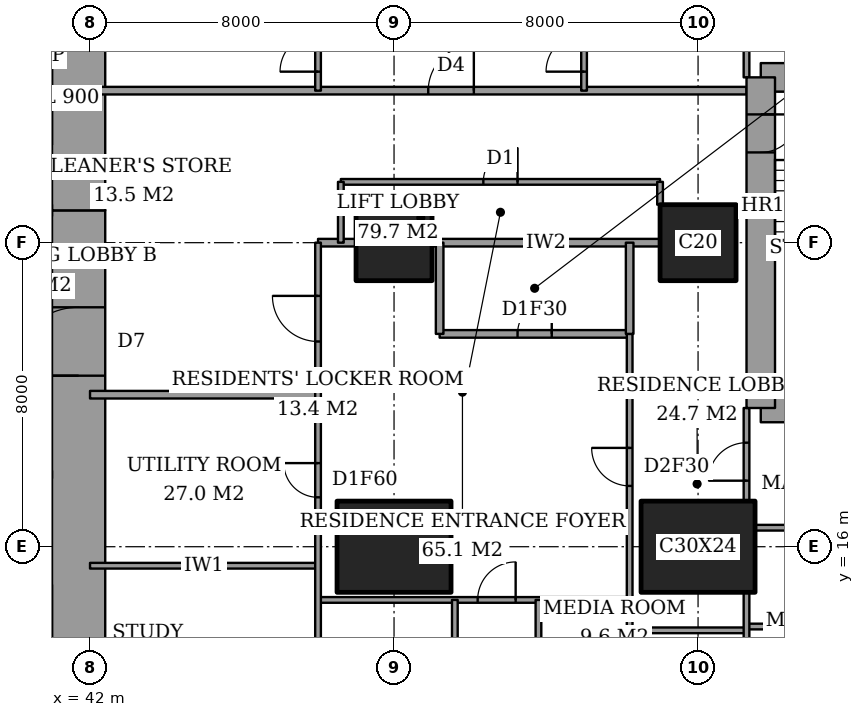
"""IFC4 building model, lengths in metres.
Left out: names, types, materials, properties, quantities, classifications, styles, units other than length and angle.
Written with IfcOpenShell. Run it as: python <this file> out.ifc"""

import sys

from ifc_helpers import new_model, si_unit, direction, frame, frame_2d, origin, origin_2d, place, context, subcontext, project, spatial, rectangle, extrude, element, fill, save


model = new_model("IFC4")
c1 = context("Model", 3, precision=1e-05, world=origin(), true_north=direction((0.0, 1.0)))
c2 = subcontext(c1, "Body", "Model", "MODEL_VIEW")
j1 = project(units=[si_unit("LENGTHUNIT", "METRE"), si_unit("PLANEANGLEUNIT", "RADIAN")], contexts=[c1])
p1 = place(None, origin())
s1 = spatial("IfcSite", under=j1, at=p1, CompositionType="ELEMENT")
p2 = place(p1, origin())
s2 = spatial("IfcBuilding", under=s1, at=p2, CompositionType="ELEMENT")
p3 = place(p2, frame((0.0, 0.0, 96.2)))
s3 = spatial("IfcBuildingStorey", under=s2, at=p3, CompositionType="ELEMENT", Elevation=96.2)
p4 = place(p3, frame((50.0, 16.0, 0.0), z_axis=(0.0, 0.0, 1.0), x_axis=(1.0, 0.0, 0.0)))
e1 = element("IfcColumn", 1, at=p4, inside=s3, PredefinedType="COLUMN", context=c2, shape_type="SweptSolid", body=[
    extrude(rectangle(XDim=3.0, YDim=2.4, at=origin_2d()), origin(), (0.0, 0.0, 1.0), 3.6),
])
p5 = place(p3, frame((50.0, 24.0, 0.0), z_axis=(0.0, 0.0, 1.0), x_axis=(1.0, 0.0, 0.0)))
e2 = element("IfcColumn", 2, at=p5, inside=s3, PredefinedType="COLUMN", context=c2, shape_type="SweptSolid", body=[
    extrude(rectangle(XDim=2.0, YDim=2.0, at=origin_2d()), origin(), (0.0, 0.0, 1.0), 3.6),
])
p6 = place(p3, frame((58.0, 16.0, 0.0), z_axis=(0.0, 0.0, 1.0), x_axis=(1.0, 0.0, 0.0)))
e3 = element("IfcColumn", 3, at=p6, inside=s3, PredefinedType="COLUMN", context=c2, shape_type="SweptSolid", body=[
    extrude(rectangle(XDim=3.0, YDim=2.4, at=origin_2d()), origin(), (0.0, 0.0, 1.0), 3.6),
])
p7 = place(p3, frame((58.0, 24.0, 0.0), z_axis=(0.0, 0.0, 1.0), x_axis=(1.0, 0.0, 0.0)))
e4 = element("IfcColumn", 4, at=p7, inside=s3, PredefinedType="COLUMN", context=c2, shape_type="SweptSolid", body=[
    extrude(rectangle(XDim=2.0, YDim=2.0, at=origin_2d()), origin(), (0.0, 0.0, 1.0), 3.6),
])
p8 = place(p3, frame((41.7, 13.0, 0.0), z_axis=(0.0, 0.0, 1.0), x_axis=(0.0, 1.0, 0.0)))
e5 = element("IfcWall", 5, at=p8, inside=s3, PredefinedType="SHEAR", context=c2, shape_type="SweptSolid", body=[
    extrude(rectangle(XDim=11.85, YDim=1.4, at=frame_2d((5.925, 0.0))), origin(), (0.0, 0.0, 1.0), 3.6),
])
p9 = place(p8, frame((7.5, 0.0, 0.0)))
e6 = element("IfcOpeningElement", 6, at=p9, cuts=e5, PredefinedType="OPENING", context=c2, shape_type="SweptSolid", body=[
    extrude(rectangle(XDim=1.8, YDim=2.4, at=frame_2d((0.9, 1.2))), frame((0.0, 0.71, 0.0), z_axis=(0.0, -1.0, 0.0), x_axis=(1.0, 0.0, 0.0)), (0.0, 0.0, 1.0), 1.42),
])
p10 = place(p3, frame((41.7, 24.85, 0.0), z_axis=(0.0, 0.0, 1.0), x_axis=(0.0, 1.0, 0.0)))
e7 = element("IfcWall", 7, at=p10, inside=s3, PredefinedType="SHEAR", context=c2, shape_type="SweptSolid", body=[
    extrude(rectangle(XDim=10.15, YDim=1.4, at=frame_2d((5.075, 0.0))), origin(), (0.0, 0.0, 1.0), 3.6),
])
for number, where, z_axis, x_axis in (
    (8, (59.65, 19.65, 0.0), (0.0, 0.0, 1.0), (1.0, 0.0, 0.0)),
    (9, (64.1, 28.35, 0.0), (0.0, 0.0, 1.0), (-1.0, 0.0, 0.0)),
):
    element("IfcWall", number, at=place(p3, frame(where, z_axis=z_axis, x_axis=x_axis)), inside=s3, PredefinedType="SHEAR", context=c2, shape_type="SweptSolid", body=[
        extrude(rectangle(XDim=4.45, YDim=0.75, at=frame_2d((2.225, 0.0))), origin(), (0.0, 0.0, 1.0), 3.6),
    ])
p11 = place(p3, frame((59.65, 28.35, 0.0), z_axis=(0.0, 0.0, 1.0), x_axis=(0.0, -1.0, 0.0)))
e10 = element("IfcWall", 10, at=p11, inside=s3, PredefinedType="SHEAR", context=c2, shape_type="SweptSolid", body=[
    extrude(rectangle(XDim=8.7, YDim=0.75, at=frame_2d((4.35, 0.0))), origin(), (0.0, 0.0, 1.0), 3.6),
])
p12 = place(p11, frame((0.975, 0.0, 0.0)))
e11 = element("IfcOpeningElement", 11, at=p12, cuts=e10, PredefinedType="OPENING", context=c2, shape_type="SweptSolid", body=[
    extrude(rectangle(XDim=1.0, YDim=2.1, at=frame_2d((0.5, 1.05))), frame((0.0, 0.385, 0.0), z_axis=(0.0, -1.0, 0.0), x_axis=(1.0, 0.0, 0.0)), (0.0, 0.0, 1.0), 0.77),
])
p13 = place(p3, frame((56.2, 13.8, 0.0), z_axis=(0.0, 0.0, 1.0), x_axis=(1.0, 0.0, 0.0)))
e12 = element("IfcWall", 12, at=p13, inside=s3, PredefinedType="PARTITIONING", context=c2, shape_type="SweptSolid", body=[
    extrude(rectangle(XDim=3.075, YDim=0.15, at=frame_2d((1.538, 0.0))), origin(), (0.0, 0.0, 1.0), 3.35),
])
p14 = place(p3, frame((59.275, 13.9, 0.0), z_axis=(0.0, 0.0, 1.0), x_axis=(1.0, 0.0, 0.0)))
e13 = element("IfcWall", 13, at=p14, inside=s3, PredefinedType="PARTITIONING", context=c2, shape_type="SweptSolid", body=[
    extrude(rectangle(XDim=2.4, YDim=0.15, at=frame_2d((1.2, 0.0))), origin(), (0.0, 0.0, 1.0), 3.35),
])
p15 = place(p3, frame((48.0, 14.6, 0.0), z_axis=(0.0, 0.0, 1.0), x_axis=(1.0, 0.0, 0.0)))
e14 = element("IfcWall", 14, at=p15, inside=s3, PredefinedType="PARTITIONING", context=c2, shape_type="SweptSolid", body=[
    extrude(rectangle(XDim=8.2, YDim=0.15, at=frame_2d((4.1, 0.0))), origin(), (0.0, 0.0, 1.0), 3.35),
])
p16 = place(p15, frame((4.2, 0.0, 0.0)))
e15 = element("IfcOpeningElement", 15, at=p16, cuts=e14, PredefinedType="OPENING", context=c2, shape_type="SweptSolid", body=[
    extrude(rectangle(XDim=1.0, YDim=2.1, at=frame_2d((0.5, 1.05))), frame((0.0, 0.085, 0.0), z_axis=(0.0, -1.0, 0.0), x_axis=(1.0, 0.0, 0.0)), (0.0, 0.0, 1.0), 0.17),
])
p17 = place(p3, frame((42.0, 15.5, 0.0), z_axis=(0.0, 0.0, 1.0), x_axis=(1.0, 0.0, 0.0)))
e16 = element("IfcWall", 16, at=p17, inside=s3, PredefinedType="PARTITIONING", context=c2, shape_type="SweptSolid", body=[
    extrude(rectangle(XDim=6.0, YDim=0.15, at=frame_2d((3.0, 0.0))), origin(), (0.0, 0.0, 1.0), 3.35),
])
p18 = place(p3, frame((59.5, 16.5, 0.0), z_axis=(0.0, 0.0, 1.0), x_axis=(1.0, 0.0, 0.0)))
e17 = element("IfcWall", 17, at=p18, inside=s3, PredefinedType="PARTITIONING", context=c2, shape_type="SweptSolid", body=[
    extrude(rectangle(XDim=5.15, YDim=0.15, at=frame_2d((2.575, 0.0))), origin(), (0.0, 0.0, 1.0), 3.35),
])
p19 = place(p3, frame((42.0, 20.0, 0.0), z_axis=(0.0, 0.0, 1.0), x_axis=(1.0, 0.0, 0.0)))
e18 = element("IfcWall", 18, at=p19, inside=s3, PredefinedType="PARTITIONING", context=c2, shape_type="SweptSolid", body=[
    extrude(rectangle(XDim=6.0, YDim=0.2, at=frame_2d((3.0, 0.0))), origin(), (0.0, 0.0, 1.0), 3.35),
])
p20 = place(p3, frame((51.2, 21.6, 0.0), z_axis=(0.0, 0.0, 1.0), x_axis=(1.0, 0.0, 0.0)))
e19 = element("IfcWall", 19, at=p20, inside=s3, PredefinedType="PARTITIONING", context=c2, shape_type="SweptSolid", body=[
    extrude(rectangle(XDim=5.0, YDim=0.2, at=frame_2d((2.5, 0.0))), origin(), (0.0, 0.0, 1.0), 3.35),
])
p21 = place(p20, frame((2.05, 0.0, 0.0)))
e20 = element("IfcOpeningElement", 20, at=p21, cuts=e19, PredefinedType="OPENING", context=c2, shape_type="SweptSolid", body=[
    extrude(rectangle(XDim=0.9, YDim=2.1, at=frame_2d((0.45, 1.05))), frame((0.0, 0.11, 0.0), z_axis=(0.0, -1.0, 0.0), x_axis=(1.0, 0.0, 0.0)), (0.0, 0.0, 1.0), 0.22),
])
p22 = place(p3, frame((48.0, 24.0, 0.0), z_axis=(0.0, 0.0, 1.0), x_axis=(1.0, 0.0, 0.0)))
e21 = element("IfcWall", 21, at=p22, inside=s3, PredefinedType="PARTITIONING", context=c2, shape_type="SweptSolid", body=[
    extrude(rectangle(XDim=1.0, YDim=0.2, at=frame_2d((0.5, 0.0))), origin(), (0.0, 0.0, 1.0), 3.35),
])
p23 = place(p3, frame((51.0, 24.0, 0.0), z_axis=(0.0, 0.0, 1.0), x_axis=(1.0, 0.0, 0.0)))
e22 = element("IfcWall", 22, at=p23, inside=s3, PredefinedType="PARTITIONING", context=c2, shape_type="SweptSolid", body=[
    extrude(rectangle(XDim=6.0, YDim=0.2, at=frame_2d((3.0, 0.0))), origin(), (0.0, 0.0, 1.0), 3.35),
])
p24 = place(p3, frame((48.6, 25.6, 0.0), z_axis=(0.0, 0.0, 1.0), x_axis=(1.0, 0.0, 0.0)))
e23 = element("IfcWall", 23, at=p24, inside=s3, PredefinedType="PARTITIONING", context=c2, shape_type="SweptSolid", body=[
    extrude(rectangle(XDim=8.4, YDim=0.15, at=frame_2d((4.2, 0.0))), origin(), (0.0, 0.0, 1.0), 3.35),
])
p25 = place(p24, frame((3.75, 0.0, 0.0)))
e24 = element("IfcOpeningElement", 24, at=p25, cuts=e23, PredefinedType="OPENING", context=c2, shape_type="SweptSolid", body=[
    extrude(rectangle(XDim=0.9, YDim=2.1, at=frame_2d((0.45, 1.05))), frame((0.0, 0.085, 0.0), z_axis=(0.0, -1.0, 0.0), x_axis=(1.0, 0.0, 0.0)), (0.0, 0.0, 1.0), 0.17),
])
p26 = place(p3, frame((42.0, 28.0, 0.0), z_axis=(0.0, 0.0, 1.0), x_axis=(1.0, 0.0, 0.0)))
e25 = element("IfcWall", 25, at=p26, inside=s3, PredefinedType="PARTITIONING", context=c2, shape_type="SweptSolid", body=[
    extrude(rectangle(XDim=17.275, YDim=0.2, at=frame_2d((8.637, 0.0))), origin(), (0.0, 0.0, 1.0), 3.35),
])
p27 = place(p26, frame((8.9, 0.0, 0.0)))
e26 = element("IfcOpeningElement", 26, at=p27, cuts=e25, PredefinedType="OPENING", context=c2, shape_type="SweptSolid", body=[
    extrude(rectangle(XDim=1.2, YDim=2.4, at=frame_2d((0.6, 1.2))), frame((0.0, 0.11, 0.0), z_axis=(0.0, -1.0, 0.0), x_axis=(1.0, 0.0, 0.0)), (0.0, 0.0, 1.0), 0.22),
])
p28 = place(p3, frame((48.0, 10.6, 0.0), z_axis=(0.0, 0.0, 1.0), x_axis=(0.0, 1.0, 0.0)))
e27 = element("IfcWall", 27, at=p28, inside=s3, PredefinedType="PARTITIONING", context=c2, shape_type="SweptSolid", body=[
    extrude(rectangle(XDim=13.4, YDim=0.15, at=frame_2d((6.7, 0.0))), origin(), (0.0, 0.0, 1.0), 3.35),
])
p29 = place(p28, frame((10.8, 0.0, 0.0)))
e28 = element("IfcOpeningElement", 28, at=p29, cuts=e27, PredefinedType="OPENING", context=c2, shape_type="SweptSolid", body=[
    extrude(rectangle(XDim=1.2, YDim=2.4, at=frame_2d((0.6, 1.2))), frame((0.0, 0.085, 0.0), z_axis=(0.0, -1.0, 0.0), x_axis=(1.0, 0.0, 0.0)), (0.0, 0.0, 1.0), 0.17),
])
p30 = place(p28, frame((6.7, 0.0, 0.0)))
e29 = element("IfcOpeningElement", 29, at=p30, cuts=e27, PredefinedType="OPENING", context=c2, shape_type="SweptSolid", body=[
    extrude(rectangle(XDim=0.9, YDim=2.1, at=frame_2d((0.45, 1.05))), frame((0.0, 0.085, 0.0), z_axis=(0.0, -1.0, 0.0), x_axis=(1.0, 0.0, 0.0)), (0.0, 0.0, 1.0), 0.17),
])
p31 = place(p3, frame((48.0, 28.0, 0.0), z_axis=(0.0, 0.0, 1.0), x_axis=(0.0, 1.0, 0.0)))
e30 = element("IfcWall", 30, at=p31, inside=s3, PredefinedType="PARTITIONING", context=c2, shape_type="SweptSolid", body=[
    extrude(rectangle(XDim=9.4, YDim=0.15, at=frame_2d((4.7, 0.0))), origin(), (0.0, 0.0, 1.0), 3.35),
])
p32 = place(p31, frame((0.5, 0.0, 0.0)))
e31 = element("IfcOpeningElement", 31, at=p32, cuts=e30, PredefinedType="OPENING", context=c2, shape_type="SweptSolid", body=[
    extrude(rectangle(XDim=1.0, YDim=2.1, at=frame_2d((0.5, 1.05))), frame((0.0, 0.085, 0.0), z_axis=(0.0, -1.0, 0.0), x_axis=(1.0, 0.0, 0.0)), (0.0, 0.0, 1.0), 0.17),
])
p33 = place(p3, frame((48.6, 24.0, 0.0), z_axis=(0.0, 0.0, 1.0), x_axis=(0.0, 1.0, 0.0)))
e32 = element("IfcWall", 32, at=p33, inside=s3, PredefinedType="PARTITIONING", context=c2, shape_type="SweptSolid", body=[
    extrude(rectangle(XDim=1.6, YDim=0.15, at=frame_2d((0.8, 0.0))), origin(), (0.0, 0.0, 1.0), 3.35),
])
p34 = place(p3, frame((51.2, 21.6, 0.0), z_axis=(0.0, 0.0, 1.0), x_axis=(0.0, 1.0, 0.0)))
e33 = element("IfcWall", 33, at=p34, inside=s3, PredefinedType="PARTITIONING", context=c2, shape_type="SweptSolid", body=[
    extrude(rectangle(XDim=2.4, YDim=0.2, at=frame_2d((1.2, 0.0))), origin(), (0.0, 0.0, 1.0), 3.35),
])
for number, where, z_axis, x_axis in (
    (34, (51.6, 10.6, 0.0), (0.0, 0.0, 1.0), (0.0, 1.0, 0.0)),
    (35, (53.8, 10.6, 0.0), (0.0, 0.0, 1.0), (0.0, 1.0, 0.0)),
):
    element("IfcWall", number, at=place(p3, frame(where, z_axis=z_axis, x_axis=x_axis)), inside=s3, PredefinedType="PARTITIONING", context=c2, shape_type="SweptSolid", body=[
        extrude(rectangle(XDim=4.0, YDim=0.15, at=frame_2d((2.0, 0.0))), origin(), (0.0, 0.0, 1.0), 3.35),
    ])
p35 = place(p3, frame((55.0, 28.0, 0.0), z_axis=(0.0, 0.0, 1.0), x_axis=(0.0, 1.0, 0.0)))
e36 = element("IfcWall", 36, at=p35, inside=s3, PredefinedType="PARTITIONING", context=c2, shape_type="SweptSolid", body=[
    extrude(rectangle(XDim=9.4, YDim=0.15, at=frame_2d((4.7, 0.0))), origin(), (0.0, 0.0, 1.0), 3.35),
])
p36 = place(p35, frame((0.5, 0.0, 0.0)))
e37 = element("IfcOpeningElement", 37, at=p36, cuts=e36, PredefinedType="OPENING", context=c2, shape_type="SweptSolid", body=[
    extrude(rectangle(XDim=1.0, YDim=2.1, at=frame_2d((0.5, 1.05))), frame((0.0, 0.085, 0.0), z_axis=(0.0, -1.0, 0.0), x_axis=(1.0, 0.0, 0.0)), (0.0, 0.0, 1.0), 0.17),
])
p37 = place(p3, frame((56.2, 21.6, 0.0), z_axis=(0.0, 0.0, 1.0), x_axis=(0.0, 1.0, 0.0)))
e38 = element("IfcWall", 38, at=p37, inside=s3, PredefinedType="PARTITIONING", context=c2, shape_type="SweptSolid", body=[
    extrude(rectangle(XDim=2.4, YDim=0.2, at=frame_2d((1.2, 0.0))), origin(), (0.0, 0.0, 1.0), 3.35),
])
p38 = place(p3, frame((56.2, 10.6, 0.0), z_axis=(0.0, 0.0, 1.0), x_axis=(0.0, 1.0, 0.0)))
e39 = element("IfcWall", 39, at=p38, inside=s3, PredefinedType="PARTITIONING", context=c2, shape_type="SweptSolid", body=[
    extrude(rectangle(XDim=11.0, YDim=0.15, at=frame_2d((5.5, 0.0))), origin(), (0.0, 0.0, 1.0), 3.35),
])
p39 = place(p38, frame((7.0, 0.0, 0.0)))
e40 = element("IfcOpeningElement", 40, at=p39, cuts=e39, PredefinedType="OPENING", context=c2, shape_type="SweptSolid", body=[
    extrude(rectangle(XDim=1.0, YDim=2.1, at=frame_2d((0.5, 1.05))), frame((0.0, 0.085, 0.0), z_axis=(0.0, -1.0, 0.0), x_axis=(1.0, 0.0, 0.0)), (0.0, 0.0, 1.0), 0.17),
])
p40 = place(p3, frame((57.0, 25.0, 0.0), z_axis=(0.0, 0.0, 1.0), x_axis=(0.0, 1.0, 0.0)))
e41 = element("IfcWall", 41, at=p40, inside=s3, PredefinedType="PARTITIONING", context=c2, shape_type="SweptSolid", body=[
    extrude(rectangle(XDim=0.6, YDim=0.15, at=frame_2d((0.3, 0.0))), origin(), (0.0, 0.0, 1.0), 3.35),
])
p41 = place(p3, frame((59.275, 10.6, 0.0), z_axis=(0.0, 0.0, 1.0), x_axis=(0.0, 1.0, 0.0)))
e42 = element("IfcWall", 42, at=p41, inside=s3, PredefinedType="PARTITIONING", context=c2, shape_type="SweptSolid", body=[
    extrude(rectangle(XDim=4.2, YDim=0.15, at=frame_2d((2.1, 0.0))), origin(), (0.0, 0.0, 1.0), 3.35),
])
p42 = place(p3, frame((59.275, 17.2, 0.0), z_axis=(0.0, 0.0, 1.0), x_axis=(0.0, 1.0, 0.0)))
e43 = element("IfcWall", 43, at=p42, inside=s3, PredefinedType="PARTITIONING", context=c2, shape_type="SweptSolid", body=[
    extrude(rectangle(XDim=2.45, YDim=0.15, at=frame_2d((1.225, 0.0))), origin(), (0.0, 0.0, 1.0), 3.35),
])
p43 = place(p42, frame((0.538, 0.0, 0.0)))
e44 = element("IfcOpeningElement", 44, at=p43, cuts=e43, PredefinedType="OPENING", context=c2, shape_type="SweptSolid", body=[
    extrude(rectangle(XDim=1.0, YDim=2.1, at=frame_2d((0.5, 1.05))), frame((0.0, 0.085, 0.0), z_axis=(0.0, -1.0, 0.0), x_axis=(1.0, 0.0, 0.0)), (0.0, 0.0, 1.0), 0.17),
])
p44 = place(p3, frame((59.275, 28.35, 0.0), z_axis=(0.0, 0.0, 1.0), x_axis=(0.0, 1.0, 0.0)))
e45 = element("IfcWall", 45, at=p44, inside=s3, PredefinedType="PARTITIONING", context=c2, shape_type="SweptSolid", body=[
    extrude(rectangle(XDim=2.45, YDim=0.15, at=frame_2d((1.225, 0.0))), origin(), (0.0, 0.0, 1.0), 3.35),
])
p45 = place(p44, frame((0.913, 0.0, 0.0)))
e46 = element("IfcOpeningElement", 46, at=p45, cuts=e45, PredefinedType="OPENING", context=c2, shape_type="SweptSolid", body=[
    extrude(rectangle(XDim=1.0, YDim=2.1, at=frame_2d((0.5, 1.05))), frame((0.0, 0.085, 0.0), z_axis=(0.0, -1.0, 0.0), x_axis=(1.0, 0.0, 0.0)), (0.0, 0.0, 1.0), 0.17),
])
p46 = place(p3, frame((28.3, 17.9, 0.0), z_axis=(0.0, 0.0, 1.0), x_axis=(1.0, 0.0, 0.0)))
e47 = element("IfcWall", 47, at=p46, inside=s3, PredefinedType="PARTITIONING", context=c2, shape_type="SweptSolid", body=[
    extrude(rectangle(XDim=12.7, YDim=0.2, at=frame_2d((6.35, 0.0))), origin(), (0.0, 0.0, 1.0), 3.6),
])
p47 = place(p46, frame((0.95, 0.0, 0.0)))
e48 = element("IfcOpeningElement", 48, at=p47, cuts=e47, PredefinedType="OPENING", context=c2, shape_type="SweptSolid", body=[
    extrude(rectangle(XDim=1.1, YDim=2.1, at=frame_2d((0.55, 1.05))), frame((0.0, 0.11, 0.0), z_axis=(0.0, -1.0, 0.0), x_axis=(1.0, 0.0, 0.0)), (0.0, 0.0, 1.0), 0.22),
])
p48 = place(p46, frame((4.15, 0.0, 0.0)))
e49 = element("IfcOpeningElement", 49, at=p48, cuts=e47, PredefinedType="OPENING", context=c2, shape_type="SweptSolid", body=[
    extrude(rectangle(XDim=1.1, YDim=2.1, at=frame_2d((0.55, 1.05))), frame((0.0, 0.11, 0.0), z_axis=(0.0, -1.0, 0.0), x_axis=(1.0, 0.0, 0.0)), (0.0, 0.0, 1.0), 0.22),
])
p49 = place(p46, frame((7.35, 0.0, 0.0)))
e50 = element("IfcOpeningElement", 50, at=p49, cuts=e47, PredefinedType="OPENING", context=c2, shape_type="SweptSolid", body=[
    extrude(rectangle(XDim=1.1, YDim=2.1, at=frame_2d((0.55, 1.05))), frame((0.0, 0.11, 0.0), z_axis=(0.0, -1.0, 0.0), x_axis=(1.0, 0.0, 0.0)), (0.0, 0.0, 1.0), 0.22),
])
p50 = place(p46, frame((10.6, 0.0, 0.0)))
e51 = element("IfcOpeningElement", 51, at=p50, cuts=e47, PredefinedType="OPENING", context=c2, shape_type="SweptSolid", body=[
    extrude(rectangle(XDim=1.2, YDim=2.1, at=frame_2d((0.6, 1.05))), frame((0.0, 0.11, 0.0), z_axis=(0.0, -1.0, 0.0), x_axis=(1.0, 0.0, 0.0)), (0.0, 0.0, 1.0), 0.22),
])
p51 = place(p43, origin())
e52 = element("IfcDoor", 52, at=p51, inside=s3, OperationType="SINGLE_SWING_RIGHT", PredefinedType="DOOR", context=c2, shape_type="SweptSolid", body=[
    extrude(rectangle(XDim=1.0, YDim=2.1, at=frame_2d((0.5, 1.05))), frame((0.0, 0.025, 0.0), z_axis=(0.0, -1.0, 0.0), x_axis=(1.0, 0.0, 0.0)), (0.0, 0.0, 1.0), 0.05),
])
fill(e44, e52)
p52 = place(p39, origin())
e53 = element("IfcDoor", 53, at=p52, inside=s3, OperationType="SINGLE_SWING_LEFT", PredefinedType="DOOR", context=c2, shape_type="SweptSolid", body=[
    extrude(rectangle(XDim=1.0, YDim=2.1, at=frame_2d((0.5, 1.05))), frame((0.0, 0.025, 0.0), z_axis=(0.0, -1.0, 0.0), x_axis=(1.0, 0.0, 0.0)), (0.0, 0.0, 1.0), 0.05),
])
fill(e40, e53)
p53 = place(p21, origin())
e54 = element("IfcDoor", 54, at=p53, inside=s3, OperationType="SINGLE_SWING_LEFT", PredefinedType="DOOR", context=c2, shape_type="SweptSolid", body=[
    extrude(rectangle(XDim=0.9, YDim=2.1, at=frame_2d((0.45, 1.05))), frame((0.0, 0.025, 0.0), z_axis=(0.0, -1.0, 0.0), x_axis=(1.0, 0.0, 0.0)), (0.0, 0.0, 1.0), 0.05),
])
fill(e20, e54)
p54 = place(p29, origin())
e55 = element("IfcDoor", 55, at=p54, inside=s3, OperationType="SINGLE_SWING_LEFT", PredefinedType="DOOR", context=c2, shape_type="SweptSolid", body=[
    extrude(rectangle(XDim=1.2, YDim=2.4, at=frame_2d((0.6, 1.2))), frame((0.0, 0.025, 0.0), z_axis=(0.0, -1.0, 0.0), x_axis=(1.0, 0.0, 0.0)), (0.0, 0.0, 1.0), 0.05),
])
fill(e28, e55)
p55 = place(p16, origin())
e56 = element("IfcDoor", 56, at=p55, inside=s3, OperationType="SINGLE_SWING_LEFT", PredefinedType="DOOR", context=c2, shape_type="SweptSolid", body=[
    extrude(rectangle(XDim=1.0, YDim=2.1, at=frame_2d((0.5, 1.05))), frame((0.0, 0.025, 0.0), z_axis=(0.0, -1.0, 0.0), x_axis=(1.0, 0.0, 0.0)), (0.0, 0.0, 1.0), 0.05),
])
fill(e15, e56)
p56 = place(p30, origin())
e57 = element("IfcDoor", 57, at=p56, inside=s3, OperationType="SINGLE_SWING_LEFT", PredefinedType="DOOR", context=c2, shape_type="SweptSolid", body=[
    extrude(rectangle(XDim=0.9, YDim=2.1, at=frame_2d((0.45, 1.05))), frame((0.0, 0.025, 0.0), z_axis=(0.0, -1.0, 0.0), x_axis=(1.0, 0.0, 0.0)), (0.0, 0.0, 1.0), 0.05),
])
fill(e29, e57)
p57 = place(p36, origin())
e58 = element("IfcDoor", 58, at=p57, inside=s3, OperationType="SINGLE_SWING_RIGHT", PredefinedType="DOOR", context=c2, shape_type="SweptSolid", body=[
    extrude(rectangle(XDim=1.0, YDim=2.1, at=frame_2d((0.5, 1.05))), frame((0.0, 0.025, 0.0), z_axis=(0.0, -1.0, 0.0), x_axis=(1.0, 0.0, 0.0)), (0.0, 0.0, 1.0), 0.05),
])
fill(e37, e58)
p58 = place(p27, origin())
e59 = element("IfcDoor", 59, at=p58, inside=s3, OperationType="SINGLE_SWING_LEFT", PredefinedType="DOOR", context=c2, shape_type="SweptSolid", body=[
    extrude(rectangle(XDim=1.2, YDim=2.4, at=frame_2d((0.6, 1.2))), frame((0.0, 0.025, 0.0), z_axis=(0.0, -1.0, 0.0), x_axis=(1.0, 0.0, 0.0)), (0.0, 0.0, 1.0), 0.05),
])
fill(e26, e59)
p59 = place(p32, origin())
e60 = element("IfcDoor", 60, at=p59, inside=s3, OperationType="SINGLE_SWING_RIGHT", PredefinedType="DOOR", context=c2, shape_type="SweptSolid", body=[
    extrude(rectangle(XDim=1.0, YDim=2.1, at=frame_2d((0.5, 1.05))), frame((0.0, 0.025, 0.0), z_axis=(0.0, -1.0, 0.0), x_axis=(1.0, 0.0, 0.0)), (0.0, 0.0, 1.0), 0.05),
])
fill(e31, e60)
p60 = place(p25, origin())
e61 = element("IfcDoor", 61, at=p60, inside=s3, OperationType="SINGLE_SWING_LEFT", PredefinedType="DOOR", context=c2, shape_type="SweptSolid", body=[
    extrude(rectangle(XDim=0.9, YDim=2.1, at=frame_2d((0.45, 1.05))), frame((0.0, 0.025, 0.0), z_axis=(0.0, -1.0, 0.0), x_axis=(1.0, 0.0, 0.0)), (0.0, 0.0, 1.0), 0.05),
])
fill(e24, e61)
p61 = place(p9, origin())
e62 = element("IfcDoor", 62, at=p61, inside=s3, OperationType="DOUBLE_DOOR_DOUBLE_SWING", PredefinedType="DOOR", context=c2, shape_type="SweptSolid", body=[
    extrude(rectangle(XDim=1.8, YDim=2.4, at=frame_2d((0.9, 1.2))), frame((0.0, 0.025, 0.0), z_axis=(0.0, -1.0, 0.0), x_axis=(1.0, 0.0, 0.0)), (0.0, 0.0, 1.0), 0.05),
])
fill(e6, e62)
p62 = place(p12, origin())
e63 = element("IfcDoor", 63, at=p62, inside=s3, OperationType="SINGLE_SWING_RIGHT", PredefinedType="DOOR", context=c2, shape_type="SweptSolid", body=[
    extrude(rectangle(XDim=1.0, YDim=2.1, at=frame_2d((0.5, 1.05))), frame((0.0, 0.025, 0.0), z_axis=(0.0, -1.0, 0.0), x_axis=(1.0, 0.0, 0.0)), (0.0, 0.0, 1.0), 0.05),
])
fill(e11, e63)
save(model, sys.argv[1])
